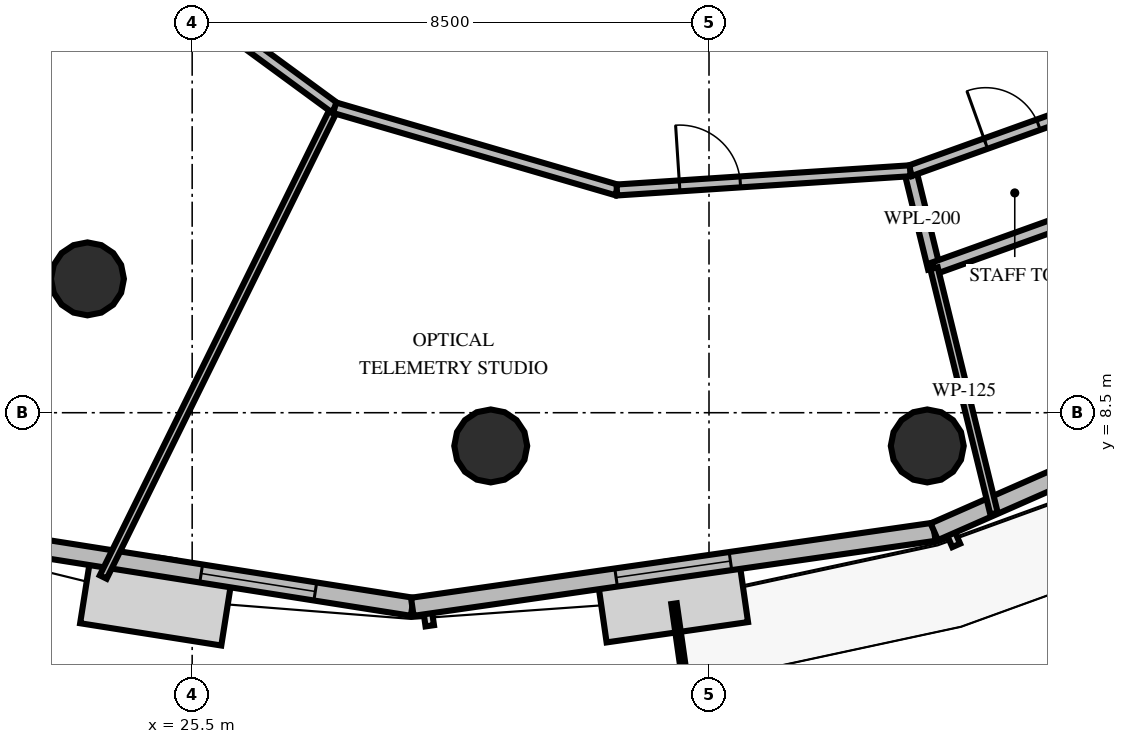
"""IFC4 building model, lengths in metres.
Left out: names, types, materials, properties, quantities, classifications, styles, units other than length and angle.
Written with IfcOpenShell. Run it as: python <this file> out.ifc"""

import sys

from ifc_helpers import new_model, si_unit, direction, frame, frame_2d, origin, origin_2d, place, context, subcontext, project, spatial, rectangle, circle, extrude, element, fill, save


model = new_model("IFC4")
c1 = context("Model", 3, precision=1e-05, world=origin(), true_north=direction((0.0, 1.0)))
c2 = subcontext(c1, "Body", "Model", "MODEL_VIEW")
j1 = project(units=[si_unit("LENGTHUNIT", "METRE"), si_unit("PLANEANGLEUNIT", "RADIAN")], contexts=[c1])
p1 = place(None, origin())
s1 = spatial("IfcSite", under=j1, at=p1, CompositionType="ELEMENT")
p2 = place(p1, origin())
s2 = spatial("IfcBuilding", under=s1, at=p2, CompositionType="ELEMENT")
p3 = place(p2, frame((0.0, 0.0, 133.8)))
s3 = spatial("IfcBuildingStorey", under=s2, at=p3, CompositionType="ELEMENT", Elevation=133.8)
for number, where, z_axis, x_axis in (
    (1, (23.778, 10.701, 0.0), (0.0, 0.0, 1.0), (1.0, 0.0, 0.0)),
    (2, (30.41, 7.954, 0.0), (0.0, 0.0, 1.0), (1.0, 0.0, 0.0)),
    (3, (37.59, 7.954, 0.0), (0.0, 0.0, 1.0), (1.0, 0.0, 0.0)),
):
    element("IfcColumn", number, at=place(p3, frame(where, z_axis=z_axis, x_axis=x_axis)), inside=s3, PredefinedType="COLUMN", context=c2, shape_type="SweptSolid", body=[
        extrude(circle(Radius=0.6, at=origin_2d()), origin(), (0.0, 0.0, 1.0), 4.0),
    ])
p4 = place(p3, frame((21.124, 6.57, 0.0), z_axis=(0.0, 0.0, 1.0), x_axis=(0.987774699815, -0.155888236905, 0.0)))
e4 = element("IfcWall", 4, at=p4, inside=s3, PredefinedType="SOLIDWALL", context=c2, shape_type="SweptSolid", body=[
    extrude(rectangle(XDim=8.095, YDim=0.3, at=frame_2d((4.048, 0.0))), origin(), (0.0, 0.0, 1.0), 2.9),
])
p5 = place(p4, frame((4.58, 0.0, 0.8)))
e5 = element("IfcOpeningElement", 5, at=p5, cuts=e4, PredefinedType="OPENING", context=c2, shape_type="SweptSolid", body=[
    extrude(rectangle(XDim=1.9, YDim=1.95, at=frame_2d((0.95, 0.975))), frame((0.0, 0.16, 0.0), z_axis=(0.0, -1.0, 0.0), x_axis=(1.0, 0.0, 0.0)), (0.0, 0.0, 1.0), 0.32),
])
p6 = place(p3, frame((29.12, 5.308, 0.0), z_axis=(0.0, 0.0, 1.0), x_axis=(0.989832051035, 0.142241030455, 0.0)))
e6 = element("IfcWall", 6, at=p6, inside=s3, PredefinedType="SOLIDWALL", context=c2, shape_type="SweptSolid", body=[
    extrude(rectangle(XDim=8.673, YDim=0.3, at=frame_2d((4.336, 0.0))), origin(), (0.0, 0.0, 1.0), 2.9),
])
p7 = place(p6, frame((3.386, 0.0, 0.8)))
e7 = element("IfcOpeningElement", 7, at=p7, cuts=e6, PredefinedType="OPENING", context=c2, shape_type="SweptSolid", body=[
    extrude(rectangle(XDim=1.9, YDim=1.95, at=frame_2d((0.95, 0.975))), frame((0.0, 0.16, 0.0), z_axis=(0.0, -1.0, 0.0), x_axis=(1.0, 0.0, 0.0)), (0.0, 0.0, 1.0), 0.32),
])
p8 = place(p3, frame((37.705, 6.542, 0.0), z_axis=(0.0, 0.0, 1.0), x_axis=(0.915305719245, 0.402759779916, 0.0)))
e8 = element("IfcWall", 8, at=p8, inside=s3, PredefinedType="SOLIDWALL", context=c2, shape_type="SweptSolid", body=[
    extrude(rectangle(XDim=8.891, YDim=0.3, at=frame_2d((4.445, 0.0))), origin(), (0.0, 0.0, 1.0), 2.9),
])
p9 = place(p8, frame((3.47, 0.0, 0.0)))
e9 = element("IfcOpeningElement", 9, at=p9, cuts=e8, PredefinedType="OPENING", context=c2, shape_type="SweptSolid", body=[
    extrude(rectangle(XDim=1.05, YDim=2.15, at=frame_2d((0.525, 1.075))), frame((0.0, 0.16, 0.0), z_axis=(0.0, -1.0, 0.0), x_axis=(1.0, 0.0, 0.0)), (0.0, 0.0, 1.0), 0.32),
])
p10 = place(p3, frame((37.309, 12.479, 0.0), z_axis=(0.0, 0.0, 1.0), x_axis=(0.237623730315, -0.971357278653, 0.0)))
e10 = element("IfcWall", 10, at=p10, inside=s3, PredefinedType="PLUMBINGWALL", context=c2, shape_type="SweptSolid", body=[
    extrude(rectangle(XDim=1.65, YDim=0.2, at=frame_2d((0.825, 0.0))), origin(), (0.0, 0.0, 1.0), 2.8),
])
p11 = place(p3, frame((37.701, 10.876, 0.0), z_axis=(0.0, 0.0, 1.0), x_axis=(0.941189166768, 0.337880085767, 0.0)))
e11 = element("IfcWall", 11, at=p11, inside=s3, PredefinedType="PLUMBINGWALL", context=c2, shape_type="SweptSolid", body=[
    extrude(rectangle(XDim=3.255, YDim=0.2, at=frame_2d((1.627, 0.0))), origin(), (0.0, 0.0, 1.0), 2.8),
])
p12 = place(p3, frame((37.309, 12.479, 0.0), z_axis=(0.0, 0.0, 1.0), x_axis=(0.94117688469, 0.33791429642, 0.0)))
e12 = element("IfcWall", 12, at=p12, inside=s3, PredefinedType="PARTITIONING", context=c2, shape_type="SweptSolid", body=[
    extrude(rectangle(XDim=2.91, YDim=0.18, at=frame_2d((1.455, 0.0))), origin(), (0.0, 0.0, 1.0), 2.8),
])
p13 = place(p12, frame((1.321, 0.0, 0.0)))
e13 = element("IfcOpeningElement", 13, at=p13, cuts=e12, PredefinedType="OPENING", context=c2, shape_type="SweptSolid", body=[
    extrude(rectangle(XDim=0.92, YDim=2.1, at=frame_2d((0.46, 1.05))), frame((0.0, 0.1, 0.0), z_axis=(0.0, -1.0, 0.0), x_axis=(1.0, 0.0, 0.0)), (0.0, 0.0, 1.0), 0.2),
])
p14 = place(p3, frame((37.701, 10.876, 0.0), z_axis=(0.0, 0.0, 1.0), x_axis=(0.237705759154, -0.971337208216, 0.0)))
e14 = element("IfcWall", 14, at=p14, inside=s3, PredefinedType="PARTITIONING", context=c2, shape_type="SweptSolid", body=[
    extrude(rectangle(XDim=4.154, YDim=0.125, at=frame_2d((2.077, 0.0))), origin(), (0.0, 0.0, 1.0), 2.8),
])
p15 = place(p3, frame((27.843, 13.515, 0.0), z_axis=(0.0, 0.0, 1.0), x_axis=(-0.442281229031, -0.896876420945, 0.0)))
e15 = element("IfcWall", 15, at=p15, inside=s3, PredefinedType="PARTITIONING", context=c2, shape_type="SweptSolid", body=[
    extrude(rectangle(XDim=8.605, YDim=0.125, at=frame_2d((4.302, 0.0))), origin(), (0.0, 0.0, 1.0), 2.8),
])
p16 = place(p3, frame((23.945, 16.374, 0.0), z_axis=(0.0, 0.0, 1.0), x_axis=(0.806443526367, -0.591311118431, 0.0)))
e16 = element("IfcWall", 16, at=p16, inside=s3, PredefinedType="PARTITIONING", context=c2, shape_type="SweptSolid", body=[
    extrude(rectangle(XDim=4.834, YDim=0.18, at=frame_2d((2.417, 0.0))), origin(), (0.0, 0.0, 1.0), 2.8),
])
p17 = place(p16, frame((1.034, 0.0, 0.0)))
e17 = element("IfcOpeningElement", 17, at=p17, cuts=e16, PredefinedType="OPENING", context=c2, shape_type="SweptSolid", body=[
    extrude(rectangle(XDim=1.0, YDim=2.15, at=frame_2d((0.5, 1.075))), frame((0.0, 0.1, 0.0), z_axis=(0.0, -1.0, 0.0), x_axis=(1.0, 0.0, 0.0)), (0.0, 0.0, 1.0), 0.2),
])
p18 = place(p3, frame((27.843, 13.515, 0.0), z_axis=(0.0, 0.0, 1.0), x_axis=(0.9600525837, -0.279819650007, 0.0)))
e18 = element("IfcWall", 18, at=p18, inside=s3, PredefinedType="PARTITIONING", context=c2, shape_type="SweptSolid", body=[
    extrude(rectangle(XDim=4.834, YDim=0.18, at=frame_2d((2.417, 0.0))), origin(), (0.0, 0.0, 1.0), 2.8),
])
p19 = place(p3, frame((32.485, 12.163, 0.0), z_axis=(0.0, 0.0, 1.0), x_axis=(0.997855867804, 0.065449729474, 0.0)))
e19 = element("IfcWall", 19, at=p19, inside=s3, PredefinedType="PARTITIONING", context=c2, shape_type="SweptSolid", body=[
    extrude(rectangle(XDim=4.834, YDim=0.18, at=frame_2d((2.417, 0.0))), origin(), (0.0, 0.0, 1.0), 2.8),
])
p20 = place(p19, frame((1.034, 0.0, 0.0)))
e20 = element("IfcOpeningElement", 20, at=p20, cuts=e19, PredefinedType="OPENING", context=c2, shape_type="SweptSolid", body=[
    extrude(rectangle(XDim=1.0, YDim=2.15, at=frame_2d((0.5, 1.075))), frame((0.0, 0.1, 0.0), z_axis=(0.0, -1.0, 0.0), x_axis=(1.0, 0.0, 0.0)), (0.0, 0.0, 1.0), 0.2),
])
p21 = place(p5, origin())
e21 = element("IfcWindow", 21, at=p21, inside=s3, PartitioningType="SINGLE_PANEL", PredefinedType="WINDOW", context=c2, shape_type="SweptSolid", body=[
    extrude(rectangle(XDim=1.9, YDim=1.95, at=frame_2d((0.95, 0.975))), frame((0.0, 0.03, 0.0), z_axis=(0.0, -1.0, 0.0), x_axis=(1.0, 0.0, 0.0)), (0.0, 0.0, 1.0), 0.06),
])
fill(e5, e21)
p22 = place(p7, origin())
e22 = element("IfcWindow", 22, at=p22, inside=s3, PartitioningType="SINGLE_PANEL", PredefinedType="WINDOW", context=c2, shape_type="SweptSolid", body=[
    extrude(rectangle(XDim=1.9, YDim=1.95, at=frame_2d((0.95, 0.975))), frame((0.0, 0.03, 0.0), z_axis=(0.0, -1.0, 0.0), x_axis=(1.0, 0.0, 0.0)), (0.0, 0.0, 1.0), 0.06),
])
fill(e7, e22)
p23 = place(p13, origin())
e23 = element("IfcDoor", 23, at=p23, inside=s3, OperationType="SINGLE_SWING_LEFT", PredefinedType="DOOR", context=c2, shape_type="SweptSolid", body=[
    extrude(rectangle(XDim=0.92, YDim=2.1, at=frame_2d((0.46, 1.05))), frame((0.0, 0.025, 0.0), z_axis=(0.0, -1.0, 0.0), x_axis=(1.0, 0.0, 0.0)), (0.0, 0.0, 1.0), 0.05),
])
fill(e13, e23)
p24 = place(p20, origin())
e24 = element("IfcDoor", 24, at=p24, inside=s3, OperationType="SINGLE_SWING_LEFT", PredefinedType="DOOR", context=c2, shape_type="SweptSolid", body=[
    extrude(rectangle(XDim=1.0, YDim=2.15, at=frame_2d((0.5, 1.075))), frame((0.0, 0.025, 0.0), z_axis=(0.0, -1.0, 0.0), x_axis=(1.0, 0.0, 0.0)), (0.0, 0.0, 1.0), 0.05),
])
fill(e20, e24)
save(model, sys.argv[1])
